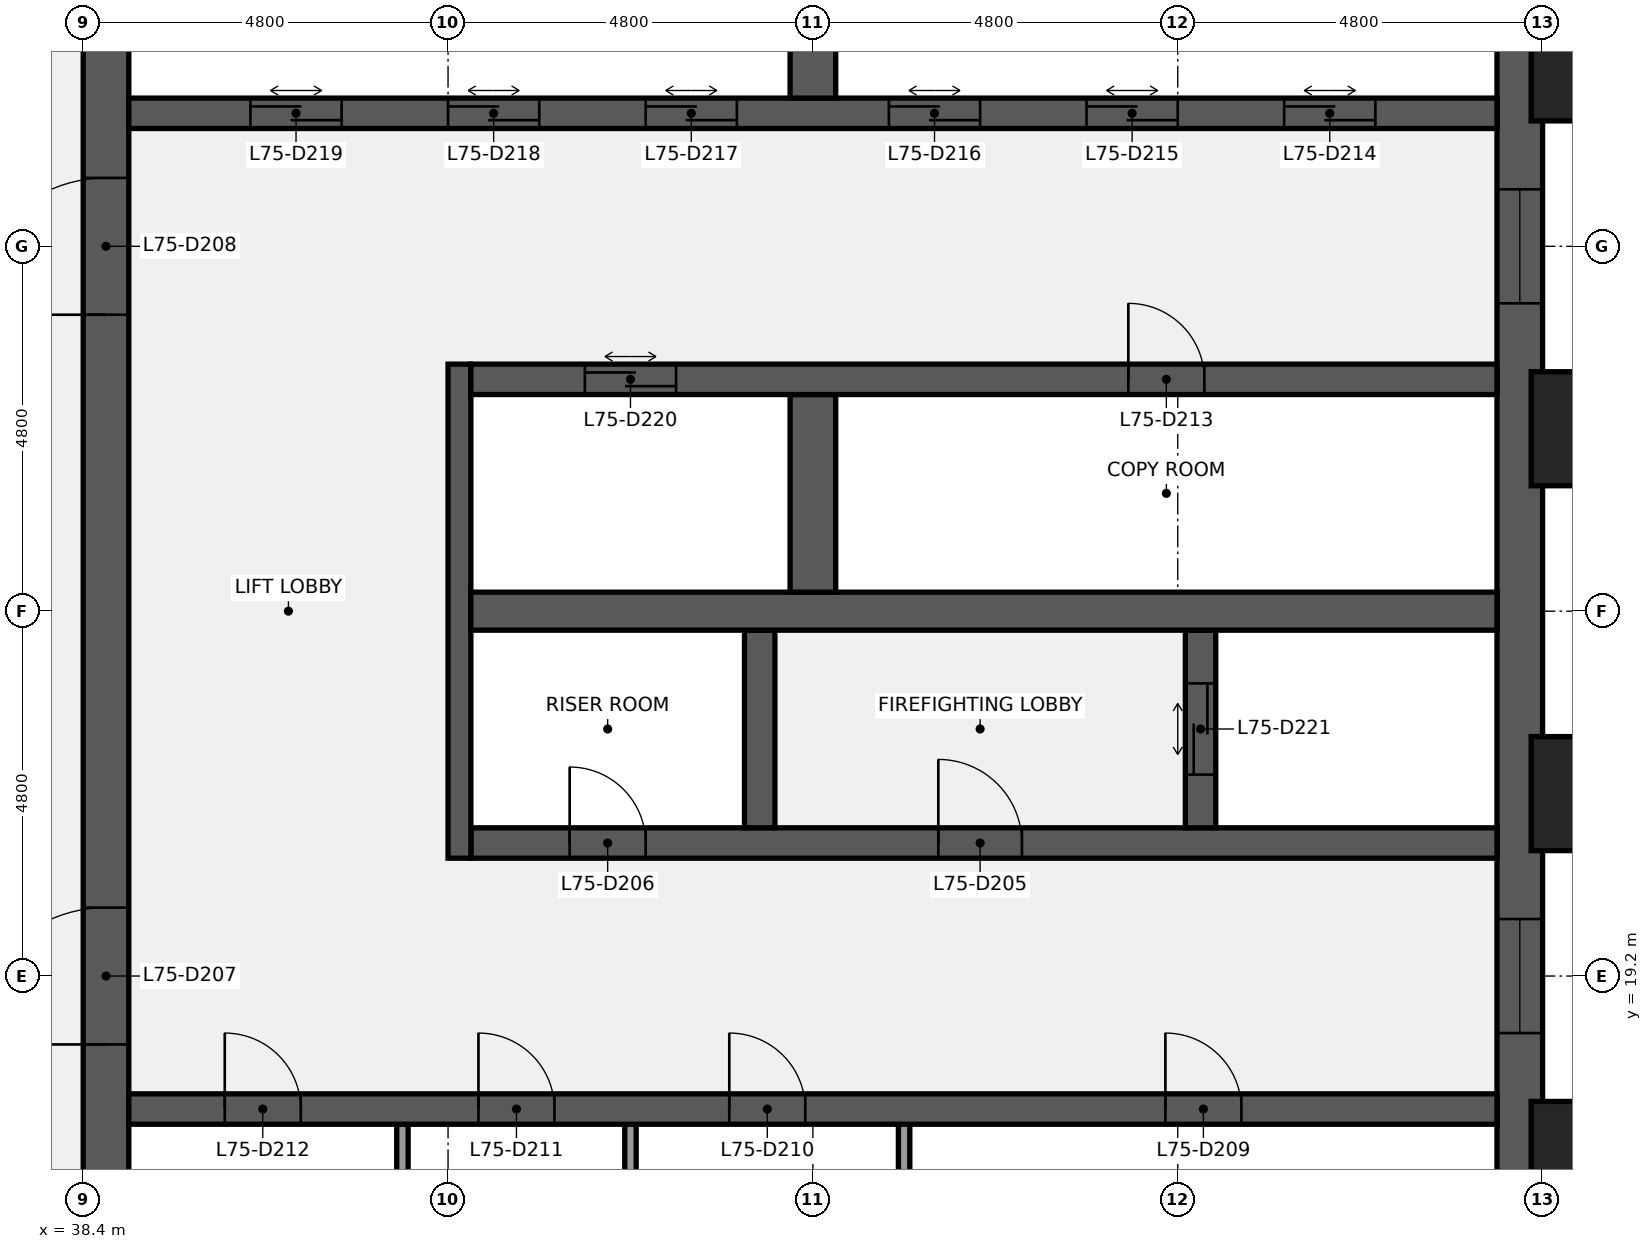
"""IFC4 building model, lengths in metres.
Left out: names, types, materials, properties, quantities, classifications, styles, units other than length and angle.
Written with IfcOpenShell. Run it as: python <this file> out.ifc"""

import sys

from ifc_helpers import new_model, si_unit, direction, frame, frame_2d, origin, origin_2d, place, context, subcontext, project, spatial, rectangle, extrude, element, fill, save


model = new_model("IFC4")
c1 = context("Model", 3, precision=1e-05, world=origin(), true_north=direction((0.0, 1.0)))
c2 = subcontext(c1, "Body", "Model", "MODEL_VIEW")
j1 = project(units=[si_unit("LENGTHUNIT", "METRE"), si_unit("PLANEANGLEUNIT", "RADIAN")], contexts=[c1])
p1 = place(None, origin())
s1 = spatial("IfcSite", under=j1, at=p1, CompositionType="ELEMENT")
p2 = place(p1, origin())
s2 = spatial("IfcBuilding", under=s1, at=p2, CompositionType="ELEMENT")
p3 = place(p2, frame((0.0, 0.0, 338.3)))
s3 = spatial("IfcBuildingStorey", under=s2, at=p3, CompositionType="ELEMENT", Elevation=338.3)
p4 = place(p3, frame((57.3, 38.4, 0.0), z_axis=(0.0, 0.0, 1.0), x_axis=(0.0, -1.0, 0.0)))
e1 = element("IfcWall", 1, at=p4, inside=s3, PredefinedType="SHEAR", context=c2, shape_type="SweptSolid", body=[
    extrude(rectangle(XDim=28.8, YDim=0.6, at=frame_2d((14.4, 0.0))), origin(), (0.0, 0.0, 1.0), 3.84),
])
p5 = place(p4, frame((18.45, 0.0, 0.9)))
e2 = element("IfcOpeningElement", 2, at=p5, cuts=e1, PredefinedType="OPENING", context=c2, shape_type="SweptSolid", body=[
    extrude(rectangle(XDim=1.5, YDim=1.5, at=frame_2d((0.75, 0.75))), frame((0.0, 0.31, 0.0), z_axis=(0.0, -1.0, 0.0), x_axis=(1.0, 0.0, 0.0)), (0.0, 0.0, 1.0), 0.62),
])
p6 = place(p4, frame((8.85, 0.0, 0.9)))
e3 = element("IfcOpeningElement", 3, at=p6, cuts=e1, PredefinedType="OPENING", context=c2, shape_type="SweptSolid", body=[
    extrude(rectangle(XDim=1.5, YDim=1.5, at=frame_2d((0.75, 0.75))), frame((0.0, 0.31, 0.0), z_axis=(0.0, -1.0, 0.0), x_axis=(1.0, 0.0, 0.0)), (0.0, 0.0, 1.0), 0.62),
])
p7 = place(p3, frame((38.7, 9.6, 0.0), z_axis=(0.0, 0.0, 1.0), x_axis=(0.0, 1.0, 0.0)))
e4 = element("IfcWall", 4, at=p7, inside=s3, PredefinedType="SHEAR", context=c2, shape_type="SweptSolid", body=[
    extrude(rectangle(XDim=28.8, YDim=0.6, at=frame_2d((14.4, 0.0))), origin(), (0.0, 0.0, 1.0), 3.84),
])
p8 = place(p7, frame((8.7, 0.0, 0.0)))
e5 = element("IfcOpeningElement", 5, at=p8, cuts=e4, PredefinedType="OPENING", context=c2, shape_type="SweptSolid", body=[
    extrude(rectangle(XDim=1.8, YDim=2.1, at=frame_2d((0.9, 1.05))), frame((0.0, 0.31, 0.0), z_axis=(0.0, -1.0, 0.0), x_axis=(1.0, 0.0, 0.0)), (0.0, 0.0, 1.0), 0.62),
])
p9 = place(p7, frame((18.3, 0.0, 0.0)))
e6 = element("IfcOpeningElement", 6, at=p9, cuts=e4, PredefinedType="OPENING", context=c2, shape_type="SweptSolid", body=[
    extrude(rectangle(XDim=1.8, YDim=2.1, at=frame_2d((0.9, 1.05))), frame((0.0, 0.31, 0.0), z_axis=(0.0, -1.0, 0.0), x_axis=(1.0, 0.0, 0.0)), (0.0, 0.0, 1.0), 0.62),
])
for number, where, z_axis, x_axis in (
    (7, (49.2, 14.65, 0.0), (0.0, 0.0, 1.0), (0.0, 1.0, 0.0)),
    (8, (45.6, 14.65, 0.0), (0.0, 0.0, 1.0), (0.0, 1.0, 0.0)),
    (9, (42.6, 14.65, 0.0), (0.0, 0.0, 1.0), (0.0, 1.0, 0.0)),
):
    element("IfcWall", number, at=place(p3, frame(where, z_axis=z_axis, x_axis=x_axis)), inside=s3, PredefinedType="PARTITIONING", context=c2, shape_type="SweptSolid", body=[
        extrude(rectangle(XDim=2.6, YDim=0.15, at=frame_2d((1.3, 0.0))), origin(), (0.0, 0.0, 1.0), 3.84),
    ])
p10 = place(p3, frame((39.0, 17.45, 0.0), z_axis=(0.0, 0.0, 1.0), x_axis=(1.0, 0.0, 0.0)))
e10 = element("IfcWall", 10, at=p10, inside=s3, PredefinedType="SHEAR", context=c2, shape_type="SweptSolid", body=[
    extrude(rectangle(XDim=18.0, YDim=0.4, at=frame_2d((9.0, 0.0))), origin(), (0.0, 0.0, 1.0), 3.84),
])
p11 = place(p10, frame((13.637, 0.0, 0.0)))
e11 = element("IfcOpeningElement", 11, at=p11, cuts=e10, PredefinedType="OPENING", context=c2, shape_type="SweptSolid", body=[
    extrude(rectangle(XDim=1.0, YDim=2.1, at=frame_2d((0.5, 1.05))), frame((0.0, 0.21, 0.0), z_axis=(0.0, -1.0, 0.0), x_axis=(1.0, 0.0, 0.0)), (0.0, 0.0, 1.0), 0.42),
])
p12 = place(p10, frame((7.9, 0.0, 0.0)))
e12 = element("IfcOpeningElement", 12, at=p12, cuts=e10, PredefinedType="OPENING", context=c2, shape_type="SweptSolid", body=[
    extrude(rectangle(XDim=1.0, YDim=2.1, at=frame_2d((0.5, 1.05))), frame((0.0, 0.21, 0.0), z_axis=(0.0, -1.0, 0.0), x_axis=(1.0, 0.0, 0.0)), (0.0, 0.0, 1.0), 0.42),
])
p13 = place(p10, frame((4.6, 0.0, 0.0)))
e13 = element("IfcOpeningElement", 13, at=p13, cuts=e10, PredefinedType="OPENING", context=c2, shape_type="SweptSolid", body=[
    extrude(rectangle(XDim=1.0, YDim=2.1, at=frame_2d((0.5, 1.05))), frame((0.0, 0.21, 0.0), z_axis=(0.0, -1.0, 0.0), x_axis=(1.0, 0.0, 0.0)), (0.0, 0.0, 1.0), 0.42),
])
p14 = place(p10, frame((1.262, 0.0, 0.0)))
e14 = element("IfcOpeningElement", 14, at=p14, cuts=e10, PredefinedType="OPENING", context=c2, shape_type="SweptSolid", body=[
    extrude(rectangle(XDim=1.0, YDim=2.1, at=frame_2d((0.5, 1.05))), frame((0.0, 0.21, 0.0), z_axis=(0.0, -1.0, 0.0), x_axis=(1.0, 0.0, 0.0)), (0.0, 0.0, 1.0), 0.42),
])
p15 = place(p3, frame((43.5, 20.95, 0.0), z_axis=(0.0, 0.0, 1.0), x_axis=(1.0, 0.0, 0.0)))
e15 = element("IfcWall", 15, at=p15, inside=s3, PredefinedType="SHEAR", context=c2, shape_type="SweptSolid", body=[
    extrude(rectangle(XDim=13.5, YDim=0.4, at=frame_2d((6.75, 0.0))), origin(), (0.0, 0.0, 1.0), 3.84),
])
p16 = place(p15, frame((6.15, 0.0, 0.0)))
e16 = element("IfcOpeningElement", 16, at=p16, cuts=e15, PredefinedType="OPENING", context=c2, shape_type="SweptSolid", body=[
    extrude(rectangle(XDim=1.1, YDim=2.1, at=frame_2d((0.55, 1.05))), frame((0.0, 0.21, 0.0), z_axis=(0.0, -1.0, 0.0), x_axis=(1.0, 0.0, 0.0)), (0.0, 0.0, 1.0), 0.42),
])
p17 = place(p15, frame((1.3, 0.0, 0.0)))
e17 = element("IfcOpeningElement", 17, at=p17, cuts=e15, PredefinedType="OPENING", context=c2, shape_type="SweptSolid", body=[
    extrude(rectangle(XDim=1.0, YDim=2.1, at=frame_2d((0.5, 1.05))), frame((0.0, 0.21, 0.0), z_axis=(0.0, -1.0, 0.0), x_axis=(1.0, 0.0, 0.0)), (0.0, 0.0, 1.0), 0.42),
])
p18 = place(p3, frame((43.35, 20.75, 0.0), z_axis=(0.0, 0.0, 1.0), x_axis=(0.0, 1.0, 0.0)))
e18 = element("IfcWall", 18, at=p18, inside=s3, PredefinedType="SHEAR", context=c2, shape_type="SweptSolid", body=[
    extrude(rectangle(XDim=6.5, YDim=0.3, at=frame_2d((3.25, 0.0))), origin(), (0.0, 0.0, 1.0), 3.84),
])
p19 = place(p3, frame((53.1, 21.15, 0.0), z_axis=(0.0, 0.0, 1.0), x_axis=(0.0, 1.0, 0.0)))
e19 = element("IfcWall", 19, at=p19, inside=s3, PredefinedType="SHEAR", context=c2, shape_type="SweptSolid", body=[
    extrude(rectangle(XDim=2.6, YDim=0.4, at=frame_2d((1.3, 0.0))), origin(), (0.0, 0.0, 1.0), 3.84),
])
p20 = place(p19, frame((0.7, 0.0, 0.0)))
e20 = element("IfcOpeningElement", 20, at=p20, cuts=e19, PredefinedType="OPENING", context=c2, shape_type="SweptSolid", body=[
    extrude(rectangle(XDim=1.2, YDim=2.1, at=frame_2d((0.6, 1.05))), frame((0.0, 0.21, 0.0), z_axis=(0.0, -1.0, 0.0), x_axis=(1.0, 0.0, 0.0)), (0.0, 0.0, 1.0), 0.42),
])
p21 = place(p3, frame((47.3, 21.15, 0.0), z_axis=(0.0, 0.0, 1.0), x_axis=(0.0, 1.0, 0.0)))
e21 = element("IfcWall", 21, at=p21, inside=s3, PredefinedType="SHEAR", context=c2, shape_type="SweptSolid", body=[
    extrude(rectangle(XDim=2.6, YDim=0.4, at=frame_2d((1.3, 0.0))), origin(), (0.0, 0.0, 1.0), 3.84),
])
p22 = place(p3, frame((43.5, 24.0, 0.0), z_axis=(0.0, 0.0, 1.0), x_axis=(1.0, 0.0, 0.0)))
e22 = element("IfcWall", 22, at=p22, inside=s3, PredefinedType="SHEAR", context=c2, shape_type="SweptSolid", body=[
    extrude(rectangle(XDim=13.5, YDim=0.5, at=frame_2d((6.75, 0.0))), origin(), (0.0, 0.0, 1.0), 3.84),
])
p23 = place(p3, frame((48.0, 24.25, 0.0), z_axis=(0.0, 0.0, 1.0), x_axis=(0.0, 1.0, 0.0)))
e23 = element("IfcWall", 23, at=p23, inside=s3, PredefinedType="SHEAR", context=c2, shape_type="SweptSolid", body=[
    extrude(rectangle(XDim=2.6, YDim=0.6, at=frame_2d((1.3, 0.0))), origin(), (0.0, 0.0, 1.0), 3.84),
])
p24 = place(p3, frame((43.5, 27.05, 0.0), z_axis=(0.0, 0.0, 1.0), x_axis=(1.0, 0.0, 0.0)))
e24 = element("IfcWall", 24, at=p24, inside=s3, PredefinedType="SHEAR", context=c2, shape_type="SweptSolid", body=[
    extrude(rectangle(XDim=13.5, YDim=0.4, at=frame_2d((6.75, 0.0))), origin(), (0.0, 0.0, 1.0), 3.84),
])
p25 = place(p24, frame((8.65, 0.0, 0.0)))
e25 = element("IfcOpeningElement", 25, at=p25, cuts=e24, PredefinedType="OPENING", context=c2, shape_type="SweptSolid", body=[
    extrude(rectangle(XDim=1.0, YDim=2.1, at=frame_2d((0.5, 1.05))), frame((0.0, 0.21, 0.0), z_axis=(0.0, -1.0, 0.0), x_axis=(1.0, 0.0, 0.0)), (0.0, 0.0, 1.0), 0.42),
])
p26 = place(p24, frame((1.5, 0.0, 0.0)))
e26 = element("IfcOpeningElement", 26, at=p26, cuts=e24, PredefinedType="OPENING", context=c2, shape_type="SweptSolid", body=[
    extrude(rectangle(XDim=1.2, YDim=2.1, at=frame_2d((0.6, 1.05))), frame((0.0, 0.21, 0.0), z_axis=(0.0, -1.0, 0.0), x_axis=(1.0, 0.0, 0.0)), (0.0, 0.0, 1.0), 0.42),
])
p27 = place(p3, frame((39.0, 30.55, 0.0), z_axis=(0.0, 0.0, 1.0), x_axis=(1.0, 0.0, 0.0)))
e27 = element("IfcWall", 27, at=p27, inside=s3, PredefinedType="SHEAR", context=c2, shape_type="SweptSolid", body=[
    extrude(rectangle(XDim=18.0, YDim=0.4, at=frame_2d((9.0, 0.0))), origin(), (0.0, 0.0, 1.0), 3.84),
])
p28 = place(p27, frame((15.2, 0.0, 0.0)))
e28 = element("IfcOpeningElement", 28, at=p28, cuts=e27, PredefinedType="OPENING", context=c2, shape_type="SweptSolid", body=[
    extrude(rectangle(XDim=1.2, YDim=2.1, at=frame_2d((0.6, 1.05))), frame((0.0, 0.21, 0.0), z_axis=(0.0, -1.0, 0.0), x_axis=(1.0, 0.0, 0.0)), (0.0, 0.0, 1.0), 0.42),
])
p29 = place(p27, frame((12.6, 0.0, 0.0)))
e29 = element("IfcOpeningElement", 29, at=p29, cuts=e27, PredefinedType="OPENING", context=c2, shape_type="SweptSolid", body=[
    extrude(rectangle(XDim=1.2, YDim=2.1, at=frame_2d((0.6, 1.05))), frame((0.0, 0.21, 0.0), z_axis=(0.0, -1.0, 0.0), x_axis=(1.0, 0.0, 0.0)), (0.0, 0.0, 1.0), 0.42),
])
p30 = place(p27, frame((10.0, 0.0, 0.0)))
e30 = element("IfcOpeningElement", 30, at=p30, cuts=e27, PredefinedType="OPENING", context=c2, shape_type="SweptSolid", body=[
    extrude(rectangle(XDim=1.2, YDim=2.1, at=frame_2d((0.6, 1.05))), frame((0.0, 0.21, 0.0), z_axis=(0.0, -1.0, 0.0), x_axis=(1.0, 0.0, 0.0)), (0.0, 0.0, 1.0), 0.42),
])
p31 = place(p27, frame((6.8, 0.0, 0.0)))
e31 = element("IfcOpeningElement", 31, at=p31, cuts=e27, PredefinedType="OPENING", context=c2, shape_type="SweptSolid", body=[
    extrude(rectangle(XDim=1.2, YDim=2.1, at=frame_2d((0.6, 1.05))), frame((0.0, 0.21, 0.0), z_axis=(0.0, -1.0, 0.0), x_axis=(1.0, 0.0, 0.0)), (0.0, 0.0, 1.0), 0.42),
])
p32 = place(p27, frame((4.2, 0.0, 0.0)))
e32 = element("IfcOpeningElement", 32, at=p32, cuts=e27, PredefinedType="OPENING", context=c2, shape_type="SweptSolid", body=[
    extrude(rectangle(XDim=1.2, YDim=2.1, at=frame_2d((0.6, 1.05))), frame((0.0, 0.21, 0.0), z_axis=(0.0, -1.0, 0.0), x_axis=(1.0, 0.0, 0.0)), (0.0, 0.0, 1.0), 0.42),
])
p33 = place(p27, frame((1.6, 0.0, 0.0)))
e33 = element("IfcOpeningElement", 33, at=p33, cuts=e27, PredefinedType="OPENING", context=c2, shape_type="SweptSolid", body=[
    extrude(rectangle(XDim=1.2, YDim=2.1, at=frame_2d((0.6, 1.05))), frame((0.0, 0.21, 0.0), z_axis=(0.0, -1.0, 0.0), x_axis=(1.0, 0.0, 0.0)), (0.0, 0.0, 1.0), 0.42),
])
p34 = place(p3, frame((48.0, 30.75, 0.0), z_axis=(0.0, 0.0, 1.0), x_axis=(0.0, 1.0, 0.0)))
e34 = element("IfcWall", 34, at=p34, inside=s3, PredefinedType="SHEAR", context=c2, shape_type="SweptSolid", body=[
    extrude(rectangle(XDim=2.6, YDim=0.6, at=frame_2d((1.3, 0.0))), origin(), (0.0, 0.0, 1.0), 3.84),
])
for number, where, z_axis, x_axis in (
    (35, (58.35, 16.8, 0.0), (0.0, 0.0, 1.0), (0.0, 1.0, 0.0)),
    (36, (58.35, 21.6, 0.0), (0.0, 0.0, 1.0), (0.0, 1.0, 0.0)),
    (37, (58.35, 26.4, 0.0), (0.0, 0.0, 1.0), (0.0, 1.0, 0.0)),
    (38, (58.35, 31.2, 0.0), (0.0, 0.0, 1.0), (0.0, 1.0, 0.0)),
):
    element("IfcColumn", number, at=place(p3, frame(where, z_axis=z_axis, x_axis=x_axis)), inside=s3, PredefinedType="PILASTER", context=c2, shape_type="SweptSolid", body=[
        extrude(rectangle(XDim=1.8, YDim=1.5, at=origin_2d()), origin(), (0.0, 0.0, 1.0), 4.0),
    ])
p35 = place(p16, origin())
e39 = element("IfcDoor", 39, at=p35, inside=s3, OperationType="SINGLE_SWING_LEFT", PredefinedType="DOOR", context=c2, shape_type="SweptSolid", body=[
    extrude(rectangle(XDim=1.1, YDim=2.1, at=frame_2d((0.55, 1.05))), frame((0.0, 0.025, 0.0), z_axis=(0.0, -1.0, 0.0), x_axis=(1.0, 0.0, 0.0)), (0.0, 0.0, 1.0), 0.05),
])
fill(e16, e39)
p36 = place(p17, origin())
e40 = element("IfcDoor", 40, at=p36, inside=s3, OperationType="SINGLE_SWING_LEFT", PredefinedType="DOOR", context=c2, shape_type="SweptSolid", body=[
    extrude(rectangle(XDim=1.0, YDim=2.1, at=frame_2d((0.5, 1.05))), frame((0.0, 0.025, 0.0), z_axis=(0.0, -1.0, 0.0), x_axis=(1.0, 0.0, 0.0)), (0.0, 0.0, 1.0), 0.05),
])
fill(e17, e40)
p37 = place(p8, origin())
e41 = element("IfcDoor", 41, at=p37, inside=s3, OperationType="DOUBLE_DOOR_SINGLE_SWING", PredefinedType="DOOR", context=c2, shape_type="SweptSolid", body=[
    extrude(rectangle(XDim=1.8, YDim=2.1, at=frame_2d((0.9, 1.05))), frame((0.0, 0.025, 0.0), z_axis=(0.0, -1.0, 0.0), x_axis=(1.0, 0.0, 0.0)), (0.0, 0.0, 1.0), 0.05),
])
fill(e5, e41)
p38 = place(p9, origin())
e42 = element("IfcDoor", 42, at=p38, inside=s3, OperationType="DOUBLE_DOOR_SINGLE_SWING", PredefinedType="DOOR", context=c2, shape_type="SweptSolid", body=[
    extrude(rectangle(XDim=1.8, YDim=2.1, at=frame_2d((0.9, 1.05))), frame((0.0, 0.025, 0.0), z_axis=(0.0, -1.0, 0.0), x_axis=(1.0, 0.0, 0.0)), (0.0, 0.0, 1.0), 0.05),
])
fill(e6, e42)
p39 = place(p11, origin())
e43 = element("IfcDoor", 43, at=p39, inside=s3, OperationType="SINGLE_SWING_LEFT", PredefinedType="DOOR", context=c2, shape_type="SweptSolid", body=[
    extrude(rectangle(XDim=1.0, YDim=2.1, at=frame_2d((0.5, 1.05))), frame((0.0, 0.025, 0.0), z_axis=(0.0, -1.0, 0.0), x_axis=(1.0, 0.0, 0.0)), (0.0, 0.0, 1.0), 0.05),
])
fill(e11, e43)
p40 = place(p12, origin())
e44 = element("IfcDoor", 44, at=p40, inside=s3, OperationType="SINGLE_SWING_LEFT", PredefinedType="DOOR", context=c2, shape_type="SweptSolid", body=[
    extrude(rectangle(XDim=1.0, YDim=2.1, at=frame_2d((0.5, 1.05))), frame((0.0, 0.025, 0.0), z_axis=(0.0, -1.0, 0.0), x_axis=(1.0, 0.0, 0.0)), (0.0, 0.0, 1.0), 0.05),
])
fill(e12, e44)
p41 = place(p13, origin())
e45 = element("IfcDoor", 45, at=p41, inside=s3, OperationType="SINGLE_SWING_LEFT", PredefinedType="DOOR", context=c2, shape_type="SweptSolid", body=[
    extrude(rectangle(XDim=1.0, YDim=2.1, at=frame_2d((0.5, 1.05))), frame((0.0, 0.025, 0.0), z_axis=(0.0, -1.0, 0.0), x_axis=(1.0, 0.0, 0.0)), (0.0, 0.0, 1.0), 0.05),
])
fill(e13, e45)
p42 = place(p14, origin())
e46 = element("IfcDoor", 46, at=p42, inside=s3, OperationType="SINGLE_SWING_LEFT", PredefinedType="DOOR", context=c2, shape_type="SweptSolid", body=[
    extrude(rectangle(XDim=1.0, YDim=2.1, at=frame_2d((0.5, 1.05))), frame((0.0, 0.025, 0.0), z_axis=(0.0, -1.0, 0.0), x_axis=(1.0, 0.0, 0.0)), (0.0, 0.0, 1.0), 0.05),
])
fill(e14, e46)
p43 = place(p25, origin())
e47 = element("IfcDoor", 47, at=p43, inside=s3, OperationType="SINGLE_SWING_LEFT", PredefinedType="DOOR", context=c2, shape_type="SweptSolid", body=[
    extrude(rectangle(XDim=1.0, YDim=2.1, at=frame_2d((0.5, 1.05))), frame((0.0, 0.025, 0.0), z_axis=(0.0, -1.0, 0.0), x_axis=(1.0, 0.0, 0.0)), (0.0, 0.0, 1.0), 0.05),
])
fill(e25, e47)
p44 = place(p28, origin())
e48 = element("IfcDoor", 48, at=p44, inside=s3, OperationType="DOUBLE_DOOR_SLIDING", PredefinedType="DOOR", context=c2, shape_type="SweptSolid", body=[
    extrude(rectangle(XDim=1.2, YDim=2.1, at=frame_2d((0.6, 1.05))), frame((0.0, 0.025, 0.0), z_axis=(0.0, -1.0, 0.0), x_axis=(1.0, 0.0, 0.0)), (0.0, 0.0, 1.0), 0.05),
])
fill(e28, e48)
p45 = place(p29, origin())
e49 = element("IfcDoor", 49, at=p45, inside=s3, OperationType="DOUBLE_DOOR_SLIDING", PredefinedType="DOOR", context=c2, shape_type="SweptSolid", body=[
    extrude(rectangle(XDim=1.2, YDim=2.1, at=frame_2d((0.6, 1.05))), frame((0.0, 0.025, 0.0), z_axis=(0.0, -1.0, 0.0), x_axis=(1.0, 0.0, 0.0)), (0.0, 0.0, 1.0), 0.05),
])
fill(e29, e49)
p46 = place(p30, origin())
e50 = element("IfcDoor", 50, at=p46, inside=s3, OperationType="DOUBLE_DOOR_SLIDING", PredefinedType="DOOR", context=c2, shape_type="SweptSolid", body=[
    extrude(rectangle(XDim=1.2, YDim=2.1, at=frame_2d((0.6, 1.05))), frame((0.0, 0.025, 0.0), z_axis=(0.0, -1.0, 0.0), x_axis=(1.0, 0.0, 0.0)), (0.0, 0.0, 1.0), 0.05),
])
fill(e30, e50)
p47 = place(p31, origin())
e51 = element("IfcDoor", 51, at=p47, inside=s3, OperationType="DOUBLE_DOOR_SLIDING", PredefinedType="DOOR", context=c2, shape_type="SweptSolid", body=[
    extrude(rectangle(XDim=1.2, YDim=2.1, at=frame_2d((0.6, 1.05))), frame((0.0, 0.025, 0.0), z_axis=(0.0, -1.0, 0.0), x_axis=(1.0, 0.0, 0.0)), (0.0, 0.0, 1.0), 0.05),
])
fill(e31, e51)
p48 = place(p32, origin())
e52 = element("IfcDoor", 52, at=p48, inside=s3, OperationType="DOUBLE_DOOR_SLIDING", PredefinedType="DOOR", context=c2, shape_type="SweptSolid", body=[
    extrude(rectangle(XDim=1.2, YDim=2.1, at=frame_2d((0.6, 1.05))), frame((0.0, 0.025, 0.0), z_axis=(0.0, -1.0, 0.0), x_axis=(1.0, 0.0, 0.0)), (0.0, 0.0, 1.0), 0.05),
])
fill(e32, e52)
p49 = place(p33, origin())
e53 = element("IfcDoor", 53, at=p49, inside=s3, OperationType="DOUBLE_DOOR_SLIDING", PredefinedType="DOOR", context=c2, shape_type="SweptSolid", body=[
    extrude(rectangle(XDim=1.2, YDim=2.1, at=frame_2d((0.6, 1.05))), frame((0.0, 0.025, 0.0), z_axis=(0.0, -1.0, 0.0), x_axis=(1.0, 0.0, 0.0)), (0.0, 0.0, 1.0), 0.05),
])
fill(e33, e53)
p50 = place(p26, origin())
e54 = element("IfcDoor", 54, at=p50, inside=s3, OperationType="DOUBLE_DOOR_SLIDING", PredefinedType="DOOR", context=c2, shape_type="SweptSolid", body=[
    extrude(rectangle(XDim=1.2, YDim=2.1, at=frame_2d((0.6, 1.05))), frame((0.0, 0.025, 0.0), z_axis=(0.0, -1.0, 0.0), x_axis=(1.0, 0.0, 0.0)), (0.0, 0.0, 1.0), 0.05),
])
fill(e26, e54)
p51 = place(p20, origin())
e55 = element("IfcDoor", 55, at=p51, inside=s3, OperationType="DOUBLE_DOOR_SLIDING", PredefinedType="DOOR", context=c2, shape_type="SweptSolid", body=[
    extrude(rectangle(XDim=1.2, YDim=2.1, at=frame_2d((0.6, 1.05))), frame((0.0, 0.025, 0.0), z_axis=(0.0, -1.0, 0.0), x_axis=(1.0, 0.0, 0.0)), (0.0, 0.0, 1.0), 0.05),
])
fill(e20, e55)
p52 = place(p5, origin())
e56 = element("IfcWindow", 56, at=p52, inside=s3, PartitioningType="SINGLE_PANEL", PredefinedType="WINDOW", context=c2, shape_type="SweptSolid", body=[
    extrude(rectangle(XDim=1.5, YDim=1.5, at=frame_2d((0.75, 0.75))), frame((0.0, 0.03, 0.0), z_axis=(0.0, -1.0, 0.0), x_axis=(1.0, 0.0, 0.0)), (0.0, 0.0, 1.0), 0.06),
])
fill(e2, e56)
p53 = place(p6, origin())
e57 = element("IfcWindow", 57, at=p53, inside=s3, PartitioningType="SINGLE_PANEL", PredefinedType="WINDOW", context=c2, shape_type="SweptSolid", body=[
    extrude(rectangle(XDim=1.5, YDim=1.5, at=frame_2d((0.75, 0.75))), frame((0.0, 0.03, 0.0), z_axis=(0.0, -1.0, 0.0), x_axis=(1.0, 0.0, 0.0)), (0.0, 0.0, 1.0), 0.06),
])
fill(e3, e57)
save(model, sys.argv[1])
